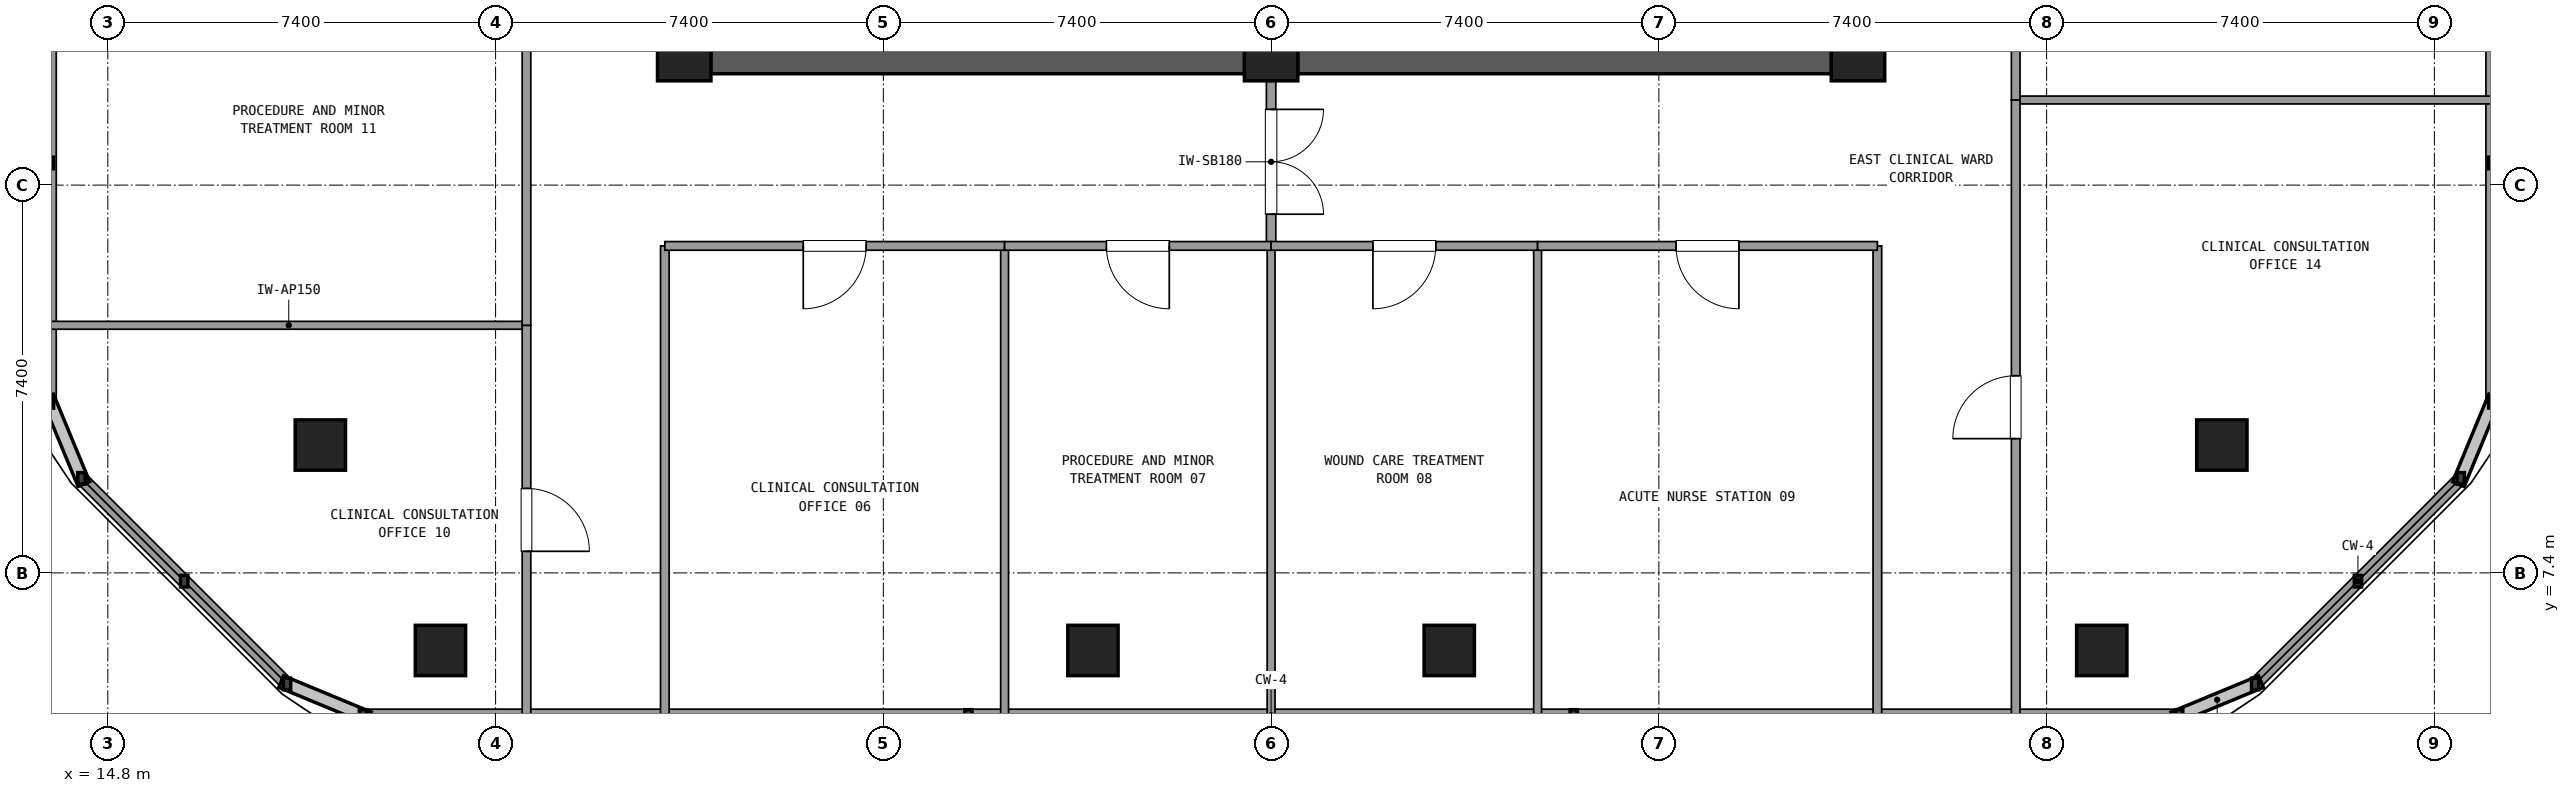
"""IFC4 building model, lengths in metres.
Left out: names, types, materials, properties, quantities, classifications, styles, units other than length and angle.
Written with IfcOpenShell. Run it as: python <this file> out.ifc"""

import sys

from ifc_helpers import new_model, si_unit, direction, frame, frame_2d, origin, origin_2d, place, context, subcontext, project, spatial, rectangle, extrude, element, fill, save


model = new_model("IFC4")
c1 = context("Model", 3, precision=1e-05, world=origin(), true_north=direction((0.0, 1.0)))
c2 = subcontext(c1, "Body", "Model", "MODEL_VIEW")
j1 = project(units=[si_unit("LENGTHUNIT", "METRE"), si_unit("PLANEANGLEUNIT", "RADIAN")], contexts=[c1])
p1 = place(None, origin())
s1 = spatial("IfcSite", under=j1, at=p1, CompositionType="ELEMENT")
p2 = place(p1, origin())
s2 = spatial("IfcBuilding", under=s1, at=p2, CompositionType="ELEMENT")
p3 = place(p2, frame((0.0, 0.0, 142.02)))
s3 = spatial("IfcBuildingStorey", under=s2, at=p3, CompositionType="ELEMENT", Elevation=142.02)
for number, where, z_axis, x_axis in (
    (1, (25.8, 17.3, 0.0), (0.0, 0.0, 1.0), (1.0, 0.0, 0.0)),
    (2, (37.0, 17.3, 0.0), (0.0, 0.0, 1.0), (1.0, 0.0, 0.0)),
    (3, (48.2, 17.3, 0.0), (0.0, 0.0, 1.0), (1.0, 0.0, 0.0)),
):
    element("IfcColumn", number, at=place(p3, frame(where, z_axis=z_axis, x_axis=x_axis)), inside=s3, PredefinedType="COLUMN", context=c2, shape_type="SweptSolid", body=[
        extrude(rectangle(XDim=1.02, YDim=1.02, at=origin_2d()), origin(), (0.0, 0.0, 1.0), 3.6),
    ])
for number, where, z_axis, x_axis in (
    (4, (26.305, 17.3, 0.0), (0.0, 0.0, 1.0), (1.0, 0.0, 0.0)),
    (5, (37.505, 17.3, 0.0), (0.0, 0.0, 1.0), (1.0, 0.0, 0.0)),
):
    element("IfcWall", number, at=place(p3, frame(where, z_axis=z_axis, x_axis=x_axis)), inside=s3, PredefinedType="SHEAR", context=c2, shape_type="SweptSolid", body=[
        extrude(rectangle(XDim=10.19, YDim=0.75, at=frame_2d((5.095, 0.0))), origin(), (0.0, 0.0, 1.0), 3.32),
    ])
for number, where, z_axis, x_axis in (
    (6, (18.856, 9.84, 0.0), (0.0, 0.0, 1.0), (1.0, 0.0, 0.0)),
    (7, (21.148, 5.92, 0.0), (0.0, 0.0, 1.0), (1.0, 0.0, 0.0)),
    (8, (33.6, 5.92, 0.0), (0.0, 0.0, 1.0), (1.0, 0.0, 0.0)),
    (9, (40.4, 5.92, 0.0), (0.0, 0.0, 1.0), (1.0, 0.0, 0.0)),
    (10, (52.852, 5.92, 0.0), (0.0, 0.0, 1.0), (1.0, 0.0, 0.0)),
    (11, (55.144, 9.84, 0.0), (0.0, 0.0, 1.0), (1.0, 0.0, 0.0)),
):
    element("IfcColumn", number, at=place(p3, frame(where, z_axis=z_axis, x_axis=x_axis)), inside=s3, PredefinedType="COLUMN", context=c2, shape_type="SweptSolid", body=[
        extrude(rectangle(XDim=0.96, YDim=0.96, at=origin_2d()), origin(), (0.0, 0.0, 1.0), 3.6),
    ])
p4 = place(p3, frame((19.671, 4.68, 0.0), z_axis=(0.0, 0.0, 1.0), x_axis=(1.0, 0.0, 0.0)))
e12 = element("IfcWall", 12, at=p4, inside=s3, PredefinedType="SOLIDWALL", context=c2, shape_type="SweptSolid", body=[
    extrude(rectangle(XDim=34.658, YDim=0.24, at=frame_2d((17.329, 0.0))), origin(), (0.0, 0.0, 1.0), 0.85),
])
p5 = place(p3, frame((55.78, 5.281, 0.0), z_axis=(0.0, 0.0, 1.0), x_axis=(0.707084777957, 0.707128783731, 0.0)))
e13 = element("IfcWall", 13, at=p5, inside=s3, PredefinedType="SOLIDWALL", context=c2, shape_type="SweptSolid", body=[
    extrude(rectangle(XDim=5.548, YDim=0.24, at=frame_2d((2.774, 0.0))), origin(), (0.0, 0.0, 1.0), 0.85),
])
for number, where, z_axis, x_axis in (
    (14, (60.304, 10.655, 0.0), (0.0, 0.0, 1.0), (0.0, 1.0, 0.0)),
    (15, (13.696, 24.36, 0.0), (0.0, 0.0, 1.0), (0.0, -1.0, 0.0)),
):
    element("IfcWall", number, at=place(p3, frame(where, z_axis=z_axis, x_axis=x_axis)), inside=s3, PredefinedType="SOLIDWALL", context=c2, shape_type="SweptSolid", body=[
        extrude(rectangle(XDim=13.705, YDim=0.24, at=frame_2d((6.853, 0.0))), origin(), (0.0, 0.0, 1.0), 0.85),
    ])
p6 = place(p3, frame((14.297, 9.204, 0.0), z_axis=(0.0, 0.0, 1.0), x_axis=(0.707084777957, -0.707128783731, 0.0)))
e16 = element("IfcWall", 16, at=p6, inside=s3, PredefinedType="SOLIDWALL", context=c2, shape_type="SweptSolid", body=[
    extrude(rectangle(XDim=5.548, YDim=0.24, at=frame_2d((2.774, 0.0))), origin(), (0.0, 0.0, 1.0), 0.85),
])
p7 = place(p3, frame((37.0, 13.64, 0.0), z_axis=(0.0, 0.0, 1.0), x_axis=(0.0, 1.0, 0.0)))
e17 = element("IfcWall", 17, at=p7, inside=s3, PredefinedType="PARTITIONING", context=c2, shape_type="SweptSolid", body=[
    extrude(rectangle(XDim=3.21, YDim=0.18, at=frame_2d((1.605, 0.0))), origin(), (0.0, 0.0, 1.0), 2.61),
])
p8 = place(p7, frame((0.605, 0.0, 0.0)))
e18 = element("IfcOpeningElement", 18, at=p8, cuts=e17, PredefinedType="OPENING", context=c2, shape_type="SweptSolid", body=[
    extrude(rectangle(XDim=2.0, YDim=2.2, at=frame_2d((1.0, 1.1))), frame((0.0, 0.1, 0.0), z_axis=(0.0, -1.0, 0.0), x_axis=(1.0, 0.0, 0.0)), (0.0, 0.0, 1.0), 0.2),
])
for number, where, z_axis, x_axis in (
    (19, (25.43, 4.7, 0.0), (0.0, 0.0, 1.0), (0.0, 1.0, 0.0)),
    (20, (48.57, 4.7, 0.0), (0.0, 0.0, 1.0), (0.0, 1.0, 0.0)),
):
    element("IfcWall", number, at=place(p3, frame(where, z_axis=z_axis, x_axis=x_axis)), inside=s3, PredefinedType="PARTITIONING", context=c2, shape_type="SweptSolid", body=[
        extrude(rectangle(XDim=8.94, YDim=0.165, at=frame_2d((4.47, 0.0))), origin(), (0.0, 0.0, 1.0), 2.61),
    ])
p9 = place(p3, frame((31.914, 13.64, 0.0), z_axis=(0.0, 0.0, 1.0), x_axis=(0.0, -1.0, 0.0)))
e21 = element("IfcWall", 21, at=p9, inside=s3, PredefinedType="PARTITIONING", context=c2, shape_type="SweptSolid", body=[
    extrude(rectangle(XDim=8.94, YDim=0.15, at=frame_2d((4.47, 0.0))), origin(), (0.0, 0.0, 1.0), 2.61),
])
p10 = place(p3, frame((25.43, 13.64, 0.0), z_axis=(0.0, 0.0, 1.0), x_axis=(1.0, 0.0, 0.0)))
e22 = element("IfcWall", 22, at=p10, inside=s3, PredefinedType="PARTITIONING", context=c2, shape_type="SweptSolid", body=[
    extrude(rectangle(XDim=6.484, YDim=0.165, at=frame_2d((3.242, 0.0))), origin(), (0.0, 0.0, 1.0), 2.61),
])
p11 = place(p10, frame((2.642, 0.0, 0.0)))
e23 = element("IfcOpeningElement", 23, at=p11, cuts=e22, PredefinedType="OPENING", context=c2, shape_type="SweptSolid", body=[
    extrude(rectangle(XDim=1.2, YDim=2.15, at=frame_2d((0.6, 1.075))), frame((0.0, 0.093, 0.0), z_axis=(0.0, -1.0, 0.0), x_axis=(1.0, 0.0, 0.0)), (0.0, 0.0, 1.0), 0.185),
])
p12 = place(p3, frame((37.0, 13.64, 0.0), z_axis=(0.0, 0.0, 1.0), x_axis=(0.0, -1.0, 0.0)))
e24 = element("IfcWall", 24, at=p12, inside=s3, PredefinedType="PARTITIONING", context=c2, shape_type="SweptSolid", body=[
    extrude(rectangle(XDim=8.94, YDim=0.15, at=frame_2d((4.47, 0.0))), origin(), (0.0, 0.0, 1.0), 2.61),
])
p13 = place(p3, frame((31.914, 13.64, 0.0), z_axis=(0.0, 0.0, 1.0), x_axis=(1.0, 0.0, 0.0)))
e25 = element("IfcWall", 25, at=p13, inside=s3, PredefinedType="PARTITIONING", context=c2, shape_type="SweptSolid", body=[
    extrude(rectangle(XDim=5.086, YDim=0.165, at=frame_2d((2.543, 0.0))), origin(), (0.0, 0.0, 1.0), 2.61),
])
p14 = place(p13, frame((1.943, 0.0, 0.0)))
e26 = element("IfcOpeningElement", 26, at=p14, cuts=e25, PredefinedType="OPENING", context=c2, shape_type="SweptSolid", body=[
    extrude(rectangle(XDim=1.2, YDim=2.15, at=frame_2d((0.6, 1.075))), frame((0.0, 0.093, 0.0), z_axis=(0.0, -1.0, 0.0), x_axis=(1.0, 0.0, 0.0)), (0.0, 0.0, 1.0), 0.185),
])
p15 = place(p3, frame((42.086, 13.64, 0.0), z_axis=(0.0, 0.0, 1.0), x_axis=(0.0, -1.0, 0.0)))
e27 = element("IfcWall", 27, at=p15, inside=s3, PredefinedType="PARTITIONING", context=c2, shape_type="SweptSolid", body=[
    extrude(rectangle(XDim=8.94, YDim=0.15, at=frame_2d((4.47, 0.0))), origin(), (0.0, 0.0, 1.0), 2.61),
])
p16 = place(p3, frame((37.0, 13.64, 0.0), z_axis=(0.0, 0.0, 1.0), x_axis=(1.0, 0.0, 0.0)))
e28 = element("IfcWall", 28, at=p16, inside=s3, PredefinedType="PARTITIONING", context=c2, shape_type="SweptSolid", body=[
    extrude(rectangle(XDim=5.086, YDim=0.165, at=frame_2d((2.543, 0.0))), origin(), (0.0, 0.0, 1.0), 2.61),
])
p17 = place(p16, frame((1.943, 0.0, 0.0)))
e29 = element("IfcOpeningElement", 29, at=p17, cuts=e28, PredefinedType="OPENING", context=c2, shape_type="SweptSolid", body=[
    extrude(rectangle(XDim=1.2, YDim=2.15, at=frame_2d((0.6, 1.075))), frame((0.0, 0.093, 0.0), z_axis=(0.0, -1.0, 0.0), x_axis=(1.0, 0.0, 0.0)), (0.0, 0.0, 1.0), 0.185),
])
p18 = place(p3, frame((42.086, 13.64, 0.0), z_axis=(0.0, 0.0, 1.0), x_axis=(1.0, 0.0, 0.0)))
e30 = element("IfcWall", 30, at=p18, inside=s3, PredefinedType="PARTITIONING", context=c2, shape_type="SweptSolid", body=[
    extrude(rectangle(XDim=6.484, YDim=0.165, at=frame_2d((3.242, 0.0))), origin(), (0.0, 0.0, 1.0), 2.61),
])
p19 = place(p18, frame((2.642, 0.0, 0.0)))
e31 = element("IfcOpeningElement", 31, at=p19, cuts=e30, PredefinedType="OPENING", context=c2, shape_type="SweptSolid", body=[
    extrude(rectangle(XDim=1.2, YDim=2.15, at=frame_2d((0.6, 1.075))), frame((0.0, 0.093, 0.0), z_axis=(0.0, -1.0, 0.0), x_axis=(1.0, 0.0, 0.0)), (0.0, 0.0, 1.0), 0.185),
])
p20 = place(p3, frame((22.79, 12.125, 0.0), z_axis=(0.0, 0.0, 1.0), x_axis=(-1.0, 0.0, 0.0)))
e32 = element("IfcWall", 32, at=p20, inside=s3, PredefinedType="PARTITIONING", context=c2, shape_type="SweptSolid", body=[
    extrude(rectangle(XDim=9.074, YDim=0.15, at=frame_2d((4.537, 0.0))), origin(), (0.0, 0.0, 1.0), 2.61),
])
p21 = place(p3, frame((22.79, 4.7, 0.0), z_axis=(0.0, 0.0, 1.0), x_axis=(0.0, 1.0, 0.0)))
e33 = element("IfcWall", 33, at=p21, inside=s3, PredefinedType="PARTITIONING", context=c2, shape_type="SweptSolid", body=[
    extrude(rectangle(XDim=7.425, YDim=0.165, at=frame_2d((3.712, 0.0))), origin(), (0.0, 0.0, 1.0), 2.61),
])
p22 = place(p21, frame((3.112, 0.0, 0.0)))
e34 = element("IfcOpeningElement", 34, at=p22, cuts=e33, PredefinedType="OPENING", context=c2, shape_type="SweptSolid", body=[
    extrude(rectangle(XDim=1.2, YDim=2.15, at=frame_2d((0.6, 1.075))), frame((0.0, 0.093, 0.0), z_axis=(0.0, -1.0, 0.0), x_axis=(1.0, 0.0, 0.0)), (0.0, 0.0, 1.0), 0.185),
])
p23 = place(p3, frame((22.79, 12.125, 0.0), z_axis=(0.0, 0.0, 1.0), x_axis=(0.0, 1.0, 0.0)))
e35 = element("IfcWall", 35, at=p23, inside=s3, PredefinedType="PARTITIONING", context=c2, shape_type="SweptSolid", body=[
    extrude(rectangle(XDim=12.115, YDim=0.165, at=frame_2d((6.058, 0.0))), origin(), (0.0, 0.0, 1.0), 2.61),
])
p24 = place(p23, frame((5.457, 0.0, 0.0)))
e36 = element("IfcOpeningElement", 36, at=p24, cuts=e35, PredefinedType="OPENING", context=c2, shape_type="SweptSolid", body=[
    extrude(rectangle(XDim=1.2, YDim=2.15, at=frame_2d((0.6, 1.075))), frame((0.0, 0.093, 0.0), z_axis=(0.0, -1.0, 0.0), x_axis=(1.0, 0.0, 0.0)), (0.0, 0.0, 1.0), 0.185),
])
p25 = place(p3, frame((51.21, 16.424, 0.0), z_axis=(0.0, 0.0, 1.0), x_axis=(1.0, 0.0, 0.0)))
e37 = element("IfcWall", 37, at=p25, inside=s3, PredefinedType="PARTITIONING", context=c2, shape_type="SweptSolid", body=[
    extrude(rectangle(XDim=9.074, YDim=0.15, at=frame_2d((4.537, 0.0))), origin(), (0.0, 0.0, 1.0), 2.61),
])
p26 = place(p3, frame((51.21, 4.7, 0.0), z_axis=(0.0, 0.0, 1.0), x_axis=(0.0, 1.0, 0.0)))
e38 = element("IfcWall", 38, at=p26, inside=s3, PredefinedType="PARTITIONING", context=c2, shape_type="SweptSolid", body=[
    extrude(rectangle(XDim=11.724, YDim=0.165, at=frame_2d((5.862, 0.0))), origin(), (0.0, 0.0, 1.0), 2.61),
])
p27 = place(p26, frame((5.262, 0.0, 0.0)))
e39 = element("IfcOpeningElement", 39, at=p27, cuts=e38, PredefinedType="OPENING", context=c2, shape_type="SweptSolid", body=[
    extrude(rectangle(XDim=1.2, YDim=2.15, at=frame_2d((0.6, 1.075))), frame((0.0, 0.093, 0.0), z_axis=(0.0, -1.0, 0.0), x_axis=(1.0, 0.0, 0.0)), (0.0, 0.0, 1.0), 0.185),
])
p28 = place(p3, frame((51.21, 16.424, 0.0), z_axis=(0.0, 0.0, 1.0), x_axis=(0.0, 1.0, 0.0)))
e40 = element("IfcWall", 40, at=p28, inside=s3, PredefinedType="PARTITIONING", context=c2, shape_type="SweptSolid", body=[
    extrude(rectangle(XDim=7.816, YDim=0.165, at=frame_2d((3.908, 0.0))), origin(), (0.0, 0.0, 1.0), 2.61),
])
p29 = place(p28, frame((3.308, 0.0, 0.0)))
e41 = element("IfcOpeningElement", 41, at=p29, cuts=e40, PredefinedType="OPENING", context=c2, shape_type="SweptSolid", body=[
    extrude(rectangle(XDim=1.2, YDim=2.15, at=frame_2d((0.6, 1.075))), frame((0.0, 0.093, 0.0), z_axis=(0.0, -1.0, 0.0), x_axis=(1.0, 0.0, 0.0)), (0.0, 0.0, 1.0), 0.185),
])
p30 = place(p8, frame((2.0, 0.0, 0.0), z_axis=(0.0, 0.0, 1.0), x_axis=(-1.0, 0.0, 0.0)))
e42 = element("IfcDoor", 42, at=p30, inside=s3, OperationType="DOUBLE_DOOR_SINGLE_SWING", PredefinedType="DOOR", context=c2, shape_type="SweptSolid", body=[
    extrude(rectangle(XDim=2.0, YDim=2.2, at=frame_2d((1.0, 1.1))), frame((0.0, 0.025, 0.0), z_axis=(0.0, -1.0, 0.0), x_axis=(1.0, 0.0, 0.0)), (0.0, 0.0, 1.0), 0.05),
])
fill(e18, e42)
p31 = place(p11, frame((1.2, 0.0, 0.0), z_axis=(0.0, 0.0, 1.0), x_axis=(-1.0, 0.0, 0.0)))
e43 = element("IfcDoor", 43, at=p31, inside=s3, OperationType="SINGLE_SWING_LEFT", PredefinedType="DOOR", context=c2, shape_type="SweptSolid", body=[
    extrude(rectangle(XDim=1.2, YDim=2.15, at=frame_2d((0.6, 1.075))), frame((0.0, 0.025, 0.0), z_axis=(0.0, -1.0, 0.0), x_axis=(1.0, 0.0, 0.0)), (0.0, 0.0, 1.0), 0.05),
])
fill(e23, e43)
p32 = place(p14, frame((1.2, 0.0, 0.0), z_axis=(0.0, 0.0, 1.0), x_axis=(-1.0, 0.0, 0.0)))
e44 = element("IfcDoor", 44, at=p32, inside=s3, OperationType="SINGLE_SWING_RIGHT", PredefinedType="DOOR", context=c2, shape_type="SweptSolid", body=[
    extrude(rectangle(XDim=1.2, YDim=2.15, at=frame_2d((0.6, 1.075))), frame((0.0, 0.025, 0.0), z_axis=(0.0, -1.0, 0.0), x_axis=(1.0, 0.0, 0.0)), (0.0, 0.0, 1.0), 0.05),
])
fill(e26, e44)
p33 = place(p17, frame((1.2, 0.0, 0.0), z_axis=(0.0, 0.0, 1.0), x_axis=(-1.0, 0.0, 0.0)))
e45 = element("IfcDoor", 45, at=p33, inside=s3, OperationType="SINGLE_SWING_LEFT", PredefinedType="DOOR", context=c2, shape_type="SweptSolid", body=[
    extrude(rectangle(XDim=1.2, YDim=2.15, at=frame_2d((0.6, 1.075))), frame((0.0, 0.025, 0.0), z_axis=(0.0, -1.0, 0.0), x_axis=(1.0, 0.0, 0.0)), (0.0, 0.0, 1.0), 0.05),
])
fill(e29, e45)
p34 = place(p19, frame((1.2, 0.0, 0.0), z_axis=(0.0, 0.0, 1.0), x_axis=(-1.0, 0.0, 0.0)))
e46 = element("IfcDoor", 46, at=p34, inside=s3, OperationType="SINGLE_SWING_RIGHT", PredefinedType="DOOR", context=c2, shape_type="SweptSolid", body=[
    extrude(rectangle(XDim=1.2, YDim=2.15, at=frame_2d((0.6, 1.075))), frame((0.0, 0.025, 0.0), z_axis=(0.0, -1.0, 0.0), x_axis=(1.0, 0.0, 0.0)), (0.0, 0.0, 1.0), 0.05),
])
fill(e31, e46)
p35 = place(p22, frame((1.2, 0.0, 0.0), z_axis=(0.0, 0.0, 1.0), x_axis=(-1.0, 0.0, 0.0)))
e47 = element("IfcDoor", 47, at=p35, inside=s3, OperationType="SINGLE_SWING_LEFT", PredefinedType="DOOR", context=c2, shape_type="SweptSolid", body=[
    extrude(rectangle(XDim=1.2, YDim=2.15, at=frame_2d((0.6, 1.075))), frame((0.0, 0.025, 0.0), z_axis=(0.0, -1.0, 0.0), x_axis=(1.0, 0.0, 0.0)), (0.0, 0.0, 1.0), 0.05),
])
fill(e34, e47)
p36 = place(p27, origin())
e48 = element("IfcDoor", 48, at=p36, inside=s3, OperationType="SINGLE_SWING_LEFT", PredefinedType="DOOR", context=c2, shape_type="SweptSolid", body=[
    extrude(rectangle(XDim=1.2, YDim=2.15, at=frame_2d((0.6, 1.075))), frame((0.0, 0.025, 0.0), z_axis=(0.0, -1.0, 0.0), x_axis=(1.0, 0.0, 0.0)), (0.0, 0.0, 1.0), 0.05),
])
fill(e39, e48)
save(model, sys.argv[1])
